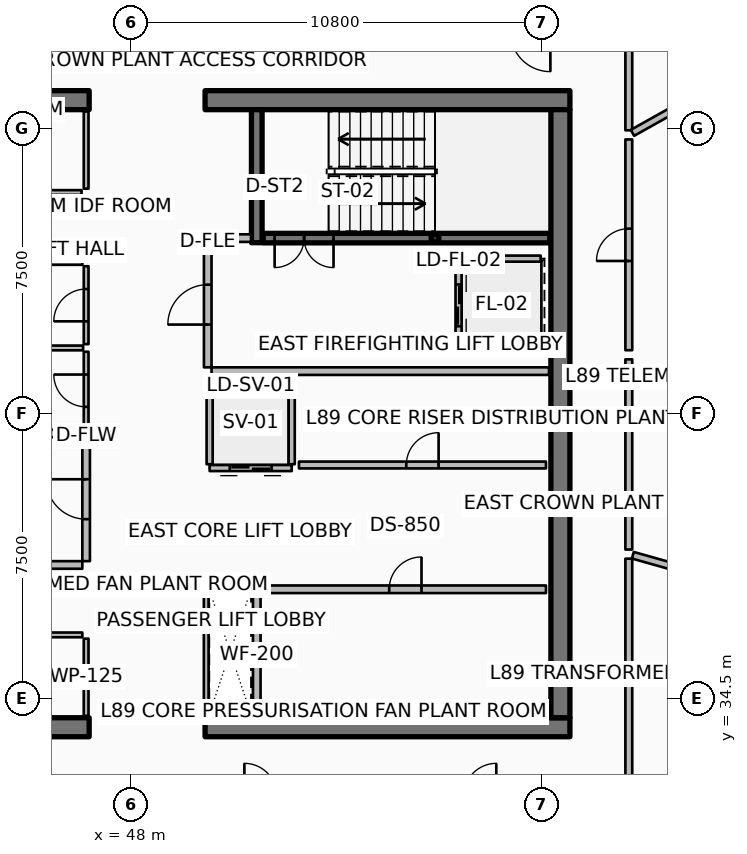
"""IFC4 building model, lengths in metres.
Left out: names, types, materials, properties, quantities, classifications, styles, units other than length and angle.
Written with IfcOpenShell. Run it as: python <this file> out.ifc"""

import sys

from ifc_helpers import new_model, si_unit, direction, frame, frame_2d, origin, origin_2d, place, context, subcontext, project, spatial, rectangle, hollow_rectangle, extrude, element, fill, save


model = new_model("IFC4")
c1 = context("Model", 3, precision=1e-05, world=origin(), true_north=direction((0.0, 1.0)))
c2 = subcontext(c1, "Body", "Model", "MODEL_VIEW")
j1 = project(units=[si_unit("LENGTHUNIT", "METRE"), si_unit("PLANEANGLEUNIT", "RADIAN")], contexts=[c1])
p1 = place(None, origin())
s1 = spatial("IfcSite", under=j1, at=p1, CompositionType="ELEMENT")
p2 = place(p1, origin())
s2 = spatial("IfcBuilding", under=s1, at=p2, CompositionType="ELEMENT")
p3 = place(p2, frame((0.0, 0.0, 356.0)))
s3 = spatial("IfcBuildingStorey", under=s2, at=p3, CompositionType="ELEMENT", Elevation=356.0)
p4 = place(p3, frame((37.3, 33.75, 0.0), z_axis=(0.0, 0.0, 1.0), x_axis=(1.0, 0.0, 0.0)))
e1 = element("IfcWall", 1, at=p4, inside=s3, PredefinedType="SHEAR", context=c2, shape_type="SweptSolid", body=[
    extrude(rectangle(XDim=9.6, YDim=0.5, at=frame_2d((4.8, 0.0))), origin(), (0.0, 0.0, 1.0), 3.6),
])
p5 = place(p3, frame((49.95, 33.75, 0.0), z_axis=(0.0, 0.0, 1.0), x_axis=(1.0, 0.0, 0.0)))
e2 = element("IfcWall", 2, at=p5, inside=s3, PredefinedType="SHEAR", context=c2, shape_type="SweptSolid", body=[
    extrude(rectangle(XDim=9.6, YDim=0.5, at=frame_2d((4.8, 0.0))), origin(), (0.0, 0.0, 1.0), 3.6),
])
p6 = place(p3, frame((37.3, 50.25, 0.0), z_axis=(0.0, 0.0, 1.0), x_axis=(1.0, 0.0, 0.0)))
e3 = element("IfcWall", 3, at=p6, inside=s3, PredefinedType="SHEAR", context=c2, shape_type="SweptSolid", body=[
    extrude(rectangle(XDim=9.6, YDim=0.5, at=frame_2d((4.8, 0.0))), origin(), (0.0, 0.0, 1.0), 3.6),
])
p7 = place(p3, frame((49.95, 50.25, 0.0), z_axis=(0.0, 0.0, 1.0), x_axis=(1.0, 0.0, 0.0)))
e4 = element("IfcWall", 4, at=p7, inside=s3, PredefinedType="SHEAR", context=c2, shape_type="SweptSolid", body=[
    extrude(rectangle(XDim=9.6, YDim=0.5, at=frame_2d((4.8, 0.0))), origin(), (0.0, 0.0, 1.0), 3.6),
])
p8 = place(p3, frame((59.3, 34.0, 0.0), z_axis=(0.0, 0.0, 1.0), x_axis=(0.0, 1.0, 0.0)))
e5 = element("IfcWall", 5, at=p8, inside=s3, PredefinedType="SHEAR", context=c2, shape_type="SweptSolid", body=[
    extrude(rectangle(XDim=16.0, YDim=0.5, at=frame_2d((8.0, 0.0))), origin(), (0.0, 0.0, 1.0), 3.6),
])
p9 = place(p3, frame((51.31, 46.5, 0.0), z_axis=(0.0, 0.0, 1.0), x_axis=(0.0, 1.0, 0.0)))
e6 = element("IfcWall", 6, at=p9, inside=s3, PredefinedType="SHEAR", context=c2, shape_type="SweptSolid", body=[
    extrude(rectangle(XDim=3.5, YDim=0.28, at=frame_2d((1.75, 0.0))), origin(), (0.0, 0.0, 1.0), 3.6),
])
p10 = place(p3, frame((56.0, 46.62, 0.0), z_axis=(0.0, 0.0, 1.0), x_axis=(1.0, 0.0, 0.0)))
e7 = element("IfcColumn", 7, at=p10, inside=s3, PredefinedType="COLUMN", context=c2, shape_type="SweptSolid", body=[
    extrude(hollow_rectangle(XDim=0.2, YDim=0.2, WallThickness=0.01, InnerFilletRadius=0.01, OuterFilletRadius=0.02, at=origin_2d()), origin(), (0.0, 0.0, 1.0), 1.595),
])
p11 = place(p3, frame((51.48, 46.62, 0.0), z_axis=(0.0, 0.0, 1.0), x_axis=(1.0, 0.0, 0.0)))
e8 = element("IfcWall", 8, at=p11, inside=s3, PredefinedType="SOLIDWALL", context=c2, shape_type="SweptSolid", body=[
    extrude(rectangle(XDim=7.54, YDim=0.25, at=frame_2d((3.77, 0.0))), origin(), (0.0, 0.0, 1.0), 3.32),
])
p12 = place(p11, frame((0.3, 0.0, 0.0)))
e9 = element("IfcOpeningElement", 9, at=p12, cuts=e8, PredefinedType="OPENING", context=c2, shape_type="SweptSolid", body=[
    extrude(rectangle(XDim=1.55, YDim=2.15, at=frame_2d((0.775, 1.075))), frame((0.0, 0.135, 0.0), z_axis=(0.0, -1.0, 0.0), x_axis=(1.0, 0.0, 0.0)), (0.0, 0.0, 1.0), 0.27),
])
p13 = place(p3, frame((51.52, 37.38, 0.0), z_axis=(0.0, 0.0, 1.0), x_axis=(1.0, 0.0, 0.0)))
e10 = element("IfcWall", 10, at=p13, inside=s3, PredefinedType="PARTITIONING", context=c2, shape_type="SweptSolid", body=[
    extrude(rectangle(XDim=7.4, YDim=0.2, at=frame_2d((3.7, 0.0))), origin(), (0.0, 0.0, 1.0), 3.32),
])
p14 = place(p13, frame((3.275, 0.0, 0.0)))
e11 = element("IfcOpeningElement", 11, at=p14, cuts=e10, PredefinedType="OPENING", context=c2, shape_type="SweptSolid", body=[
    extrude(rectangle(XDim=0.85, YDim=2.06, at=frame_2d((0.425, 1.03))), frame((0.0, 0.11, 0.0), z_axis=(0.0, -1.0, 0.0), x_axis=(1.0, 0.0, 0.0)), (0.0, 0.0, 1.0), 0.22),
])
p15 = place(p3, frame((51.31, 34.05, 0.0), z_axis=(0.0, 0.0, 1.0), x_axis=(0.0, 1.0, 0.0)))
e12 = element("IfcWall", 12, at=p15, inside=s3, PredefinedType="PARTITIONING", context=c2, shape_type="SweptSolid", body=[
    extrude(rectangle(XDim=3.21, YDim=0.2, at=frame_2d((1.605, 0.0))), origin(), (0.0, 0.0, 1.0), 3.32),
])
p16 = place(p3, frame((56.62, 46.08, 0.0), z_axis=(0.0, 0.0, 1.0), x_axis=(0.0, -1.0, 0.0)))
e13 = element("IfcWall", 13, at=p16, inside=s3, PredefinedType="PARTITIONING", context=c2, shape_type="SweptSolid", body=[
    extrude(rectangle(XDim=2.46, YDim=0.16, at=frame_2d((1.23, 0.0))), origin(), (0.0, 0.0, 1.0), 3.32),
])
p17 = place(p16, frame((0.68, 0.0, 0.0)))
e14 = element("IfcOpeningElement", 14, at=p17, cuts=e13, PredefinedType="OPENING", context=c2, shape_type="SweptSolid", body=[
    extrude(rectangle(XDim=1.1, YDim=2.1, at=frame_2d((0.55, 1.05))), frame((0.0, 0.09, 0.0), z_axis=(0.0, -1.0, 0.0), x_axis=(1.0, 0.0, 0.0)), (0.0, 0.0, 1.0), 0.18),
])
for number, where, z_axis, x_axis in (
    (15, (56.72, 46.08, 0.0), (0.0, 0.0, 1.0), (1.0, 0.0, 0.0)),
    (16, (56.72, 43.62, 0.0), (0.0, 0.0, 1.0), (1.0, 0.0, 0.0)),
):
    element("IfcWall", number, at=place(p3, frame(where, z_axis=z_axis, x_axis=x_axis)), inside=s3, PredefinedType="PARTITIONING", context=c2, shape_type="SweptSolid", body=[
        extrude(rectangle(XDim=2.06, YDim=0.16, at=frame_2d((1.03, 0.0))), origin(), (0.0, 0.0, 1.0), 3.32),
    ])
p18 = place(p3, frame((52.23, 40.57, 0.0), z_axis=(0.0, 0.0, 1.0), x_axis=(-1.0, 0.0, 0.0)))
e17 = element("IfcWall", 17, at=p18, inside=s3, PredefinedType="PARTITIONING", context=c2, shape_type="SweptSolid", body=[
    extrude(rectangle(XDim=2.16, YDim=0.16, at=frame_2d((1.08, 0.0))), origin(), (0.0, 0.0, 1.0), 3.32),
])
p19 = place(p18, frame((0.53, 0.0, 0.0)))
e18 = element("IfcOpeningElement", 18, at=p19, cuts=e17, PredefinedType="OPENING", context=c2, shape_type="SweptSolid", body=[
    extrude(rectangle(XDim=1.1, YDim=2.1, at=frame_2d((0.55, 1.05))), frame((0.0, 0.09, 0.0), z_axis=(0.0, -1.0, 0.0), x_axis=(1.0, 0.0, 0.0)), (0.0, 0.0, 1.0), 0.18),
])
for number, where, z_axis, x_axis in (
    (19, (52.23, 40.67, 0.0), (0.0, 0.0, 1.0), (0.0, 1.0, 0.0)),
    (20, (50.07, 40.67, 0.0), (0.0, 0.0, 1.0), (0.0, 1.0, 0.0)),
):
    element("IfcWall", number, at=place(p3, frame(where, z_axis=z_axis, x_axis=x_axis)), inside=s3, PredefinedType="PARTITIONING", context=c2, shape_type="SweptSolid", body=[
        extrude(rectangle(XDim=2.16, YDim=0.16, at=frame_2d((1.08, 0.0))), origin(), (0.0, 0.0, 1.0), 3.32),
    ])
p20 = place(p3, frame((50.17, 42.93, 0.0), z_axis=(0.0, 0.0, 1.0), x_axis=(1.0, 0.0, 0.0)))
e21 = element("IfcWall", 21, at=p20, inside=s3, PredefinedType="PARTITIONING", context=c2, shape_type="SweptSolid", body=[
    extrude(rectangle(XDim=1.96, YDim=0.16, at=frame_2d((0.98, 0.0))), origin(), (0.0, 0.0, 1.0), 3.32),
])
p21 = place(p3, frame((52.42, 40.65, 0.0), z_axis=(0.0, 0.0, 1.0), x_axis=(1.0, 0.0, 0.0)))
e22 = element("IfcWall", 22, at=p21, inside=s3, PredefinedType="PARTITIONING", context=c2, shape_type="SweptSolid", body=[
    extrude(rectangle(XDim=6.5, YDim=0.18, at=frame_2d((3.25, 0.0))), origin(), (0.0, 0.0, 1.0), 3.32),
])
p22 = place(p21, frame((2.825, 0.0, 0.0)))
e23 = element("IfcOpeningElement", 23, at=p22, cuts=e22, PredefinedType="OPENING", context=c2, shape_type="SweptSolid", body=[
    extrude(rectangle(XDim=0.85, YDim=2.06, at=frame_2d((0.425, 1.03))), frame((0.0, 0.1, 0.0), z_axis=(0.0, -1.0, 0.0), x_axis=(1.0, 0.0, 0.0)), (0.0, 0.0, 1.0), 0.2),
])
p23 = place(p3, frame((46.82, 34.05, 0.0), z_axis=(0.0, 0.0, 1.0), x_axis=(0.0, 1.0, 0.0)))
e24 = element("IfcWall", 24, at=p23, inside=s3, PredefinedType="PARTITIONING", context=c2, shape_type="SweptSolid", body=[
    extrude(rectangle(XDim=2.03, YDim=0.125, at=frame_2d((1.015, 0.0))), origin(), (0.0, 0.0, 1.0), 2.76),
])
p24 = place(p3, frame((42.6, 36.18, 0.0), z_axis=(0.0, 0.0, 1.0), x_axis=(1.0, 0.0, 0.0)))
e25 = element("IfcWall", 25, at=p24, inside=s3, PredefinedType="PARTITIONING", context=c2, shape_type="SweptSolid", body=[
    extrude(rectangle(XDim=4.12, YDim=0.125, at=frame_2d((2.06, 0.0))), origin(), (0.0, 0.0, 1.0), 2.76),
])
p25 = place(p24, frame((1.635, 0.0, 0.0)))
e26 = element("IfcOpeningElement", 26, at=p25, cuts=e25, PredefinedType="OPENING", context=c2, shape_type="SweptSolid", body=[
    extrude(rectangle(XDim=0.85, YDim=2.06, at=frame_2d((0.425, 1.03))), frame((0.0, 0.073, 0.0), z_axis=(0.0, -1.0, 0.0), x_axis=(1.0, 0.0, 0.0)), (0.0, 0.0, 1.0), 0.145),
])
p26 = place(p3, frame((46.82, 47.92, 0.0), z_axis=(0.0, 0.0, 1.0), x_axis=(0.0, 1.0, 0.0)))
e27 = element("IfcWall", 27, at=p26, inside=s3, PredefinedType="PARTITIONING", context=c2, shape_type="SweptSolid", body=[
    extrude(rectangle(XDim=2.03, YDim=0.125, at=frame_2d((1.015, 0.0))), origin(), (0.0, 0.0, 1.0), 2.76),
])
p27 = place(p3, frame((37.92, 47.82, 0.0), z_axis=(0.0, 0.0, 1.0), x_axis=(1.0, 0.0, 0.0)))
e28 = element("IfcWall", 28, at=p27, inside=s3, PredefinedType="PARTITIONING", context=c2, shape_type="SweptSolid", body=[
    extrude(rectangle(XDim=8.78, YDim=0.125, at=frame_2d((4.39, 0.0))), origin(), (0.0, 0.0, 1.0), 2.76),
])
p28 = place(p27, frame((3.965, 0.0, 0.0)))
e29 = element("IfcOpeningElement", 29, at=p28, cuts=e28, PredefinedType="OPENING", context=c2, shape_type="SweptSolid", body=[
    extrude(rectangle(XDim=0.85, YDim=2.06, at=frame_2d((0.425, 1.03))), frame((0.0, 0.073, 0.0), z_axis=(0.0, -1.0, 0.0), x_axis=(1.0, 0.0, 0.0)), (0.0, 0.0, 1.0), 0.145),
])
p29 = place(p3, frame((41.35, 38.02, 0.0), z_axis=(0.0, 0.0, 1.0), x_axis=(1.0, 0.0, 0.0)))
e30 = element("IfcWall", 30, at=p29, inside=s3, PredefinedType="PARTITIONING", context=c2, shape_type="SweptSolid", body=[
    extrude(rectangle(XDim=5.37, YDim=0.2, at=frame_2d((2.685, 0.0))), origin(), (0.0, 0.0, 1.0), 3.32),
])
p30 = place(p3, frame((43.92, 41.48, 0.0), z_axis=(0.0, 0.0, 1.0), x_axis=(1.0, 0.0, 0.0)))
e31 = element("IfcWall", 31, at=p30, inside=s3, PredefinedType="PARTITIONING", context=c2, shape_type="SweptSolid", body=[
    extrude(rectangle(XDim=2.8, YDim=0.2, at=frame_2d((1.4, 0.0))), origin(), (0.0, 0.0, 1.0), 3.32),
])
p31 = place(p3, frame((46.82, 38.12, 0.0), z_axis=(0.0, 0.0, 1.0), x_axis=(0.0, 1.0, 0.0)))
e32 = element("IfcWall", 32, at=p31, inside=s3, PredefinedType="PARTITIONING", context=c2, shape_type="SweptSolid", body=[
    extrude(rectangle(XDim=3.26, YDim=0.2, at=frame_2d((1.63, 0.0))), origin(), (0.0, 0.0, 1.0), 3.32),
])
p32 = place(p31, frame((1.105, 0.0, 0.0)))
e33 = element("IfcOpeningElement", 33, at=p32, cuts=e32, PredefinedType="OPENING", context=c2, shape_type="SweptSolid", body=[
    extrude(rectangle(XDim=1.05, YDim=2.1, at=frame_2d((0.525, 1.05))), frame((0.0, 0.11, 0.0), z_axis=(0.0, -1.0, 0.0), x_axis=(1.0, 0.0, 0.0)), (0.0, 0.0, 1.0), 0.22),
])
p33 = place(p3, frame((50.12, 43.12, 0.0), z_axis=(0.0, 0.0, 1.0), x_axis=(1.0, 0.0, 0.0)))
e34 = element("IfcWall", 34, at=p33, inside=s3, PredefinedType="PARTITIONING", context=c2, shape_type="SweptSolid", body=[
    extrude(rectangle(XDim=8.88, YDim=0.2, at=frame_2d((4.44, 0.0))), origin(), (0.0, 0.0, 1.0), 3.32),
])
p34 = place(p3, frame((50.14, 46.62, 0.0), z_axis=(0.0, 0.0, 1.0), x_axis=(1.0, 0.0, 0.0)))
e35 = element("IfcWall", 35, at=p34, inside=s3, PredefinedType="PARTITIONING", context=c2, shape_type="SweptSolid", body=[
    extrude(rectangle(XDim=1.02, YDim=0.2, at=frame_2d((0.51, 0.0))), origin(), (0.0, 0.0, 1.0), 3.32),
])
p35 = place(p3, frame((50.02, 43.22, 0.0), z_axis=(0.0, 0.0, 1.0), x_axis=(0.0, 1.0, 0.0)))
e36 = element("IfcWall", 36, at=p35, inside=s3, PredefinedType="PARTITIONING", context=c2, shape_type="SweptSolid", body=[
    extrude(rectangle(XDim=3.3, YDim=0.2, at=frame_2d((1.65, 0.0))), origin(), (0.0, 0.0, 1.0), 3.32),
])
p36 = place(p35, frame((1.125, 0.0, 0.0)))
e37 = element("IfcOpeningElement", 37, at=p36, cuts=e36, PredefinedType="OPENING", context=c2, shape_type="SweptSolid", body=[
    extrude(rectangle(XDim=1.05, YDim=2.1, at=frame_2d((0.525, 1.05))), frame((0.0, 0.11, 0.0), z_axis=(0.0, -1.0, 0.0), x_axis=(1.0, 0.0, 0.0)), (0.0, 0.0, 1.0), 0.22),
])
p37 = place(p3, frame((41.36, 45.98, 0.0), z_axis=(0.0, 0.0, 1.0), x_axis=(1.0, 0.0, 0.0)))
e38 = element("IfcWall", 38, at=p37, inside=s3, PredefinedType="PARTITIONING", context=c2, shape_type="SweptSolid", body=[
    extrude(rectangle(XDim=5.36, YDim=0.125, at=frame_2d((2.68, 0.0))), origin(), (0.0, 0.0, 1.0), 2.76),
])
p38 = place(p3, frame((49.98, 34.06, 0.0), z_axis=(0.0, 0.0, 1.0), x_axis=(0.0, 1.0, 0.0)))
e39 = element("IfcWall", 39, at=p38, inside=s3, PredefinedType="PARTITIONING", context=c2, shape_type="SweptSolid", body=[
    extrude(rectangle(XDim=3.4, YDim=0.125, at=frame_2d((1.7, 0.0))), origin(), (0.0, 0.0, 1.0), 2.76),
])
p39 = place(p3, frame((49.98, 37.44, 0.0), z_axis=(0.0, 0.0, 1.0), x_axis=(1.0, 0.0, 0.0)))
e40 = element("IfcWall", 40, at=p39, inside=s3, PredefinedType="PARTITIONING", context=c2, shape_type="SweptSolid", body=[
    extrude(rectangle(XDim=1.26, YDim=0.125, at=frame_2d((0.63, 0.0))), origin(), (0.0, 0.0, 1.0), 2.76),
])
p40 = place(p3, frame((44.03, 43.73, 0.0), z_axis=(0.0, 0.0, 1.0), x_axis=(1.0, 0.0, 0.0)))
e41 = element("IfcWall", 41, at=p40, inside=s3, PredefinedType="PARTITIONING", context=c2, shape_type="SweptSolid", body=[
    extrude(rectangle(XDim=2.71, YDim=0.125, at=frame_2d((1.355, 0.0))), origin(), (0.0, 0.0, 1.0), 2.76),
])
p41 = place(p3, frame((46.82, 41.58, 0.0), z_axis=(0.0, 0.0, 1.0), x_axis=(0.0, 1.0, 0.0)))
e42 = element("IfcWall", 42, at=p41, inside=s3, PredefinedType="PARTITIONING", context=c2, shape_type="SweptSolid", body=[
    extrude(rectangle(XDim=2.05, YDim=0.125, at=frame_2d((1.025, 0.0))), origin(), (0.0, 0.0, 1.0), 2.76),
])
p42 = place(p41, frame((0.6, 0.0, 0.0)))
e43 = element("IfcOpeningElement", 43, at=p42, cuts=e42, PredefinedType="OPENING", context=c2, shape_type="SweptSolid", body=[
    extrude(rectangle(XDim=0.85, YDim=2.06, at=frame_2d((0.425, 1.03))), frame((0.0, 0.073, 0.0), z_axis=(0.0, -1.0, 0.0), x_axis=(1.0, 0.0, 0.0)), (0.0, 0.0, 1.0), 0.145),
])
p43 = place(p3, frame((46.82, 43.83, 0.0), z_axis=(0.0, 0.0, 1.0), x_axis=(0.0, 1.0, 0.0)))
e44 = element("IfcWall", 44, at=p43, inside=s3, PredefinedType="PARTITIONING", context=c2, shape_type="SweptSolid", body=[
    extrude(rectangle(XDim=2.05, YDim=0.125, at=frame_2d((1.025, 0.0))), origin(), (0.0, 0.0, 1.0), 2.76),
])
p44 = place(p43, frame((0.6, 0.0, 0.0)))
e45 = element("IfcOpeningElement", 45, at=p44, cuts=e44, PredefinedType="OPENING", context=c2, shape_type="SweptSolid", body=[
    extrude(rectangle(XDim=0.85, YDim=2.06, at=frame_2d((0.425, 1.03))), frame((0.0, 0.073, 0.0), z_axis=(0.0, -1.0, 0.0), x_axis=(1.0, 0.0, 0.0)), (0.0, 0.0, 1.0), 0.145),
])
p45 = place(p3, frame((61.1, 49.456, 0.0), z_axis=(0.0, 0.0, 1.0), x_axis=(0.0, 1.0, 0.0)))
e46 = element("IfcWall", 46, at=p45, inside=s3, PredefinedType="PARTITIONING", context=c2, shape_type="SweptSolid", body=[
    extrude(rectangle(XDim=2.474, YDim=0.18, at=frame_2d((1.237, 0.0))), origin(), (0.0, 0.0, 1.0), 2.76),
])
p46 = place(p3, frame((61.196, 49.39, 0.0), z_axis=(0.0, 0.0, 1.0), x_axis=(0.87249769897, 0.488618220385, 0.0)))
e47 = element("IfcWall", 47, at=p46, inside=s3, PredefinedType="PARTITIONING", context=c2, shape_type="SweptSolid", body=[
    extrude(rectangle(XDim=6.007, YDim=0.18, at=frame_2d((3.003, 0.0))), origin(), (0.0, 0.0, 1.0), 2.76),
])
p47 = place(p3, frame((61.1, 32.07, 0.0), z_axis=(0.0, 0.0, 1.0), x_axis=(0.0, 1.0, 0.0)))
e48 = element("IfcWall", 48, at=p47, inside=s3, PredefinedType="PARTITIONING", context=c2, shape_type="SweptSolid", body=[
    extrude(rectangle(XDim=6.115, YDim=0.18, at=frame_2d((3.058, 0.0))), origin(), (0.0, 0.0, 1.0), 2.76),
])
p48 = place(p3, frame((61.206, 38.275, 0.0), z_axis=(0.0, 0.0, 1.0), x_axis=(0.962461547865, -0.271418070294, 0.0)))
e49 = element("IfcWall", 49, at=p48, inside=s3, PredefinedType="PARTITIONING", context=c2, shape_type="SweptSolid", body=[
    extrude(rectangle(XDim=6.612, YDim=0.18, at=frame_2d((3.306, 0.0))), origin(), (0.0, 0.0, 1.0), 2.76),
])
p49 = place(p3, frame((61.1, 38.425, 0.0), z_axis=(0.0, 0.0, 1.0), x_axis=(0.0, 1.0, 0.0)))
e50 = element("IfcWall", 50, at=p49, inside=s3, PredefinedType="PARTITIONING", context=c2, shape_type="SweptSolid", body=[
    extrude(rectangle(XDim=5.005, YDim=0.18, at=frame_2d((2.502, 0.0))), origin(), (0.0, 0.0, 1.0), 2.76),
])
p50 = place(p3, frame((61.1, 43.67, 0.0), z_axis=(0.0, 0.0, 1.0), x_axis=(0.0, 1.0, 0.0)))
e51 = element("IfcWall", 51, at=p50, inside=s3, PredefinedType="PARTITIONING", context=c2, shape_type="SweptSolid", body=[
    extrude(rectangle(XDim=5.546, YDim=0.18, at=frame_2d((2.773, 0.0))), origin(), (0.0, 0.0, 1.0), 2.76),
])
p51 = place(p50, frame((2.348, 0.0, 0.0)))
e52 = element("IfcOpeningElement", 52, at=p51, cuts=e51, PredefinedType="OPENING", context=c2, shape_type="SweptSolid", body=[
    extrude(rectangle(XDim=0.85, YDim=2.06, at=frame_2d((0.425, 1.03))), frame((0.0, 0.1, 0.0), z_axis=(0.0, -1.0, 0.0), x_axis=(1.0, 0.0, 0.0)), (0.0, 0.0, 1.0), 0.2),
])
p52 = place(p12, origin())
e53 = element("IfcDoor", 53, at=p52, inside=s3, OperationType="DOUBLE_DOOR_SINGLE_SWING", PredefinedType="DOOR", context=c2, shape_type="SweptSolid", body=[
    extrude(rectangle(XDim=1.55, YDim=2.15, at=frame_2d((0.775, 1.075))), frame((0.0, 0.025, 0.0), z_axis=(0.0, -1.0, 0.0), x_axis=(1.0, 0.0, 0.0)), (0.0, 0.0, 1.0), 0.05),
])
fill(e9, e53)
p53 = place(p14, origin())
e54 = element("IfcDoor", 54, at=p53, inside=s3, OperationType="SINGLE_SWING_RIGHT", PredefinedType="DOOR", context=c2, shape_type="SweptSolid", body=[
    extrude(rectangle(XDim=0.85, YDim=2.06, at=frame_2d((0.425, 1.03))), frame((0.0, 0.025, 0.0), z_axis=(0.0, -1.0, 0.0), x_axis=(1.0, 0.0, 0.0)), (0.0, 0.0, 1.0), 0.05),
])
fill(e11, e54)
p54 = place(p17, origin())
e55 = element("IfcDoor", 55, at=p54, inside=s3, OperationType="DOUBLE_DOOR_SLIDING", PredefinedType="DOOR", context=c2, shape_type="SweptSolid", body=[
    extrude(rectangle(XDim=1.1, YDim=2.1, at=frame_2d((0.55, 1.05))), frame((0.0, 0.025, 0.0), z_axis=(0.0, -1.0, 0.0), x_axis=(1.0, 0.0, 0.0)), (0.0, 0.0, 1.0), 0.05),
])
fill(e14, e55)
p55 = place(p19, origin())
e56 = element("IfcDoor", 56, at=p55, inside=s3, OperationType="DOUBLE_DOOR_SLIDING", PredefinedType="DOOR", context=c2, shape_type="SweptSolid", body=[
    extrude(rectangle(XDim=1.1, YDim=2.1, at=frame_2d((0.55, 1.05))), frame((0.0, 0.025, 0.0), z_axis=(0.0, -1.0, 0.0), x_axis=(1.0, 0.0, 0.0)), (0.0, 0.0, 1.0), 0.05),
])
fill(e18, e56)
p56 = place(p22, origin())
e57 = element("IfcDoor", 57, at=p56, inside=s3, OperationType="SINGLE_SWING_RIGHT", PredefinedType="DOOR", context=c2, shape_type="SweptSolid", body=[
    extrude(rectangle(XDim=0.85, YDim=2.06, at=frame_2d((0.425, 1.03))), frame((0.0, 0.025, 0.0), z_axis=(0.0, -1.0, 0.0), x_axis=(1.0, 0.0, 0.0)), (0.0, 0.0, 1.0), 0.05),
])
fill(e23, e57)
p57 = place(p32, origin())
e58 = element("IfcDoor", 58, at=p57, inside=s3, OperationType="SINGLE_SWING_RIGHT", PredefinedType="DOOR", context=c2, shape_type="SweptSolid", body=[
    extrude(rectangle(XDim=1.05, YDim=2.1, at=frame_2d((0.525, 1.05))), frame((0.0, 0.025, 0.0), z_axis=(0.0, -1.0, 0.0), x_axis=(1.0, 0.0, 0.0)), (0.0, 0.0, 1.0), 0.05),
])
fill(e33, e58)
p58 = place(p36, origin())
e59 = element("IfcDoor", 59, at=p58, inside=s3, OperationType="SINGLE_SWING_LEFT", PredefinedType="DOOR", context=c2, shape_type="SweptSolid", body=[
    extrude(rectangle(XDim=1.05, YDim=2.1, at=frame_2d((0.525, 1.05))), frame((0.0, 0.025, 0.0), z_axis=(0.0, -1.0, 0.0), x_axis=(1.0, 0.0, 0.0)), (0.0, 0.0, 1.0), 0.05),
])
fill(e37, e59)
p59 = place(p42, origin())
e60 = element("IfcDoor", 60, at=p59, inside=s3, OperationType="SINGLE_SWING_RIGHT", PredefinedType="DOOR", context=c2, shape_type="SweptSolid", body=[
    extrude(rectangle(XDim=0.85, YDim=2.06, at=frame_2d((0.425, 1.03))), frame((0.0, 0.025, 0.0), z_axis=(0.0, -1.0, 0.0), x_axis=(1.0, 0.0, 0.0)), (0.0, 0.0, 1.0), 0.05),
])
fill(e43, e60)
p60 = place(p44, origin())
e61 = element("IfcDoor", 61, at=p60, inside=s3, OperationType="SINGLE_SWING_LEFT", PredefinedType="DOOR", context=c2, shape_type="SweptSolid", body=[
    extrude(rectangle(XDim=0.85, YDim=2.06, at=frame_2d((0.425, 1.03))), frame((0.0, 0.025, 0.0), z_axis=(0.0, -1.0, 0.0), x_axis=(1.0, 0.0, 0.0)), (0.0, 0.0, 1.0), 0.05),
])
fill(e45, e61)
p61 = place(p51, origin())
e62 = element("IfcDoor", 62, at=p61, inside=s3, OperationType="SINGLE_SWING_LEFT", PredefinedType="DOOR", context=c2, shape_type="SweptSolid", body=[
    extrude(rectangle(XDim=0.85, YDim=2.06, at=frame_2d((0.425, 1.03))), frame((0.0, 0.025, 0.0), z_axis=(0.0, -1.0, 0.0), x_axis=(1.0, 0.0, 0.0)), (0.0, 0.0, 1.0), 0.05),
])
fill(e52, e62)
save(model, sys.argv[1])
